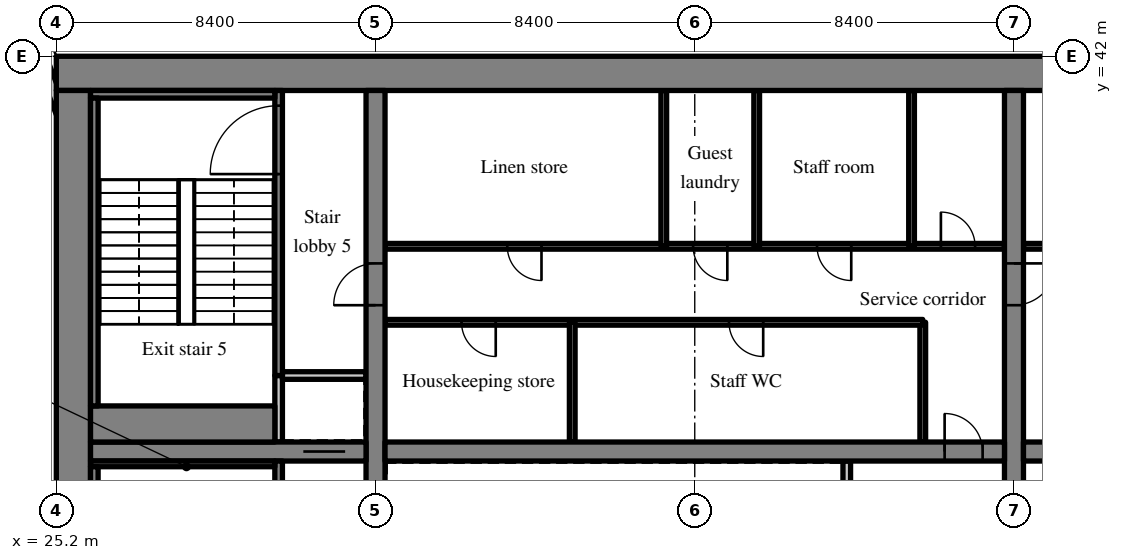
"""IFC4 building model, lengths in metres.
Left out: names, types, materials, properties, quantities, classifications, styles, units other than length and angle.
Written with IfcOpenShell. Run it as: python <this file> out.ifc"""

import sys

from ifc_helpers import new_model, si_unit, direction, frame, frame_2d, origin, place, context, subcontext, project, spatial, rectangle, extrude, source, transform, mapped, element, fill, save


model = new_model("IFC4")
c1 = context("Model", 3, precision=1e-05, world=origin(), true_north=direction((0.0, 1.0)))
c2 = subcontext(c1, "Body", "Model", "MODEL_VIEW")
j1 = project(units=[si_unit("LENGTHUNIT", "METRE"), si_unit("PLANEANGLEUNIT", "RADIAN")], contexts=[c1])
p1 = place(None, origin())
s1 = spatial("IfcSite", under=j1, at=p1, CompositionType="ELEMENT")
p2 = place(p1, origin())
s2 = spatial("IfcBuilding", under=s1, at=p2, CompositionType="ELEMENT")
p3 = place(p2, frame((0.0, 0.0, 95.2)))
s3 = spatial("IfcBuildingStorey", under=s2, at=p3, CompositionType="ELEMENT", Elevation=95.2)
m1 = source(origin(), c2, "Body", "SweptSolid", [
    extrude(rectangle(XDim=50.4, YDim=0.9, at=frame_2d((25.2, 0.0))), origin(), (0.0, 0.0, 1.0), 3.52),
])
p4 = place(p3, frame((25.2, 41.55, 0.0), z_axis=(0.0, 0.0, 1.0), x_axis=(1.0, 0.0, 0.0)))
e1 = element("IfcWall", 1, at=p4, inside=s3, PredefinedType="SHEAR", context=c2, shape_type="MappedRepresentation", body=[
    mapped(m1, transform((0.0, 0.0, 0.0), scale=1.0)),
])
m2 = source(origin(), c2, "Body", "SweptSolid", [
    extrude(rectangle(XDim=18.2, YDim=0.9, at=frame_2d((9.1, 0.0))), origin(), (0.0, 0.0, 1.0), 3.52),
])
p5 = place(p3, frame((25.65, 22.9, 0.0), z_axis=(0.0, 0.0, 1.0), x_axis=(0.0, 1.0, 0.0)))
e2 = element("IfcWall", 2, at=p5, inside=s3, PredefinedType="SHEAR", context=c2, shape_type="MappedRepresentation", body=[
    mapped(m2, transform((0.0, 0.0, 0.0), scale=1.0)),
])
m3 = source(origin(), c2, "Body", "SweptSolid", [
    extrude(rectangle(XDim=18.2, YDim=0.5, at=frame_2d((9.1, 0.0))), origin(), (0.0, 0.0, 1.0), 3.52),
])
p6 = place(p3, frame((33.6, 22.9, 0.0), z_axis=(0.0, 0.0, 1.0), x_axis=(0.0, 1.0, 0.0)))
e3 = element("IfcWall", 3, at=p6, inside=s3, PredefinedType="SHEAR", context=c2, shape_type="MappedRepresentation", body=[
    mapped(m3, transform((0.0, 0.0, 0.0), scale=1.0)),
])
m4 = source(origin(), c2, "Body", "SweptSolid", [
    extrude(rectangle(XDim=1.1, YDim=2.1, at=frame_2d((0.55, 1.05))), frame((0.0, 0.26, 0.0), z_axis=(0.0, -1.0, 0.0), x_axis=(1.0, 0.0, 0.0)), (0.0, 0.0, 1.0), 0.52),
])
p7 = place(p6, frame((12.55, 0.0, 0.0)))
e4 = element("IfcOpeningElement", 4, at=p7, cuts=e3, PredefinedType="OPENING", context=c2, shape_type="MappedRepresentation", body=[
    mapped(m4, transform((0.0, 0.0, 0.0), scale=1.0)),
])
p8 = place(p3, frame((50.4, 22.9, 0.0), z_axis=(0.0, 0.0, 1.0), x_axis=(0.0, 1.0, 0.0)))
e5 = element("IfcWall", 5, at=p8, inside=s3, PredefinedType="SHEAR", context=c2, shape_type="MappedRepresentation", body=[
    mapped(m3, transform((0.0, 0.0, 0.0), scale=1.0)),
])
p9 = place(p8, frame((12.55, 0.0, 0.0)))
e6 = element("IfcOpeningElement", 6, at=p9, cuts=e5, PredefinedType="OPENING", context=c2, shape_type="MappedRepresentation", body=[
    mapped(m4, transform((0.0, 0.0, 0.0), scale=1.0)),
])
m5 = source(origin(), c2, "Body", "SweptSolid", [
    extrude(rectangle(XDim=7.25, YDim=0.5, at=frame_2d((3.625, 0.0))), origin(), (0.0, 0.0, 1.0), 3.52),
])
p10 = place(p3, frame((26.1, 31.6, 0.0), z_axis=(0.0, 0.0, 1.0), x_axis=(1.0, 0.0, 0.0)))
e7 = element("IfcWall", 7, at=p10, inside=s3, PredefinedType="SHEAR", context=c2, shape_type="MappedRepresentation", body=[
    mapped(m5, transform((0.0, 0.0, 0.0), scale=1.0)),
])
p11 = place(p10, frame((5.6, 0.0, 0.0)))
e8 = element("IfcOpeningElement", 8, at=p11, cuts=e7, PredefinedType="OPENING", context=c2, shape_type="MappedRepresentation", body=[
    mapped(m4, transform((0.0, 0.0, 0.0), scale=1.0)),
])
m6 = source(origin(), c2, "Body", "SweptSolid", [
    extrude(rectangle(XDim=16.3, YDim=0.5, at=frame_2d((8.15, 0.0))), origin(), (0.0, 0.0, 1.0), 3.52),
])
p12 = place(p3, frame((33.85, 31.6, 0.0), z_axis=(0.0, 0.0, 1.0), x_axis=(1.0, 0.0, 0.0)))
e9 = element("IfcWall", 9, at=p12, inside=s3, PredefinedType="SHEAR", context=c2, shape_type="MappedRepresentation", body=[
    mapped(m6, transform((0.0, 0.0, 0.0), scale=1.0)),
])
m7 = source(origin(), c2, "Body", "SweptSolid", [
    extrude(rectangle(XDim=1.0, YDim=2.1, at=frame_2d((0.5, 1.05))), frame((0.0, 0.26, 0.0), z_axis=(0.0, -1.0, 0.0), x_axis=(1.0, 0.0, 0.0)), (0.0, 0.0, 1.0), 0.52),
])
p13 = place(p12, frame((14.725, 0.0, 0.0)))
e10 = element("IfcOpeningElement", 10, at=p13, cuts=e9, PredefinedType="OPENING", context=c2, shape_type="MappedRepresentation", body=[
    mapped(m7, transform((0.0, 0.0, 0.0), scale=1.0)),
])
m8 = source(origin(), c2, "Body", "SweptSolid", [
    extrude(rectangle(XDim=16.3, YDim=0.5, at=frame_2d((8.15, 0.0))), origin(), (0.0, 0.0, 1.0), 3.52),
])
p14 = place(p3, frame((50.65, 31.6, 0.0), z_axis=(0.0, 0.0, 1.0), x_axis=(1.0, 0.0, 0.0)))
e11 = element("IfcWall", 11, at=p14, inside=s3, PredefinedType="SHEAR", context=c2, shape_type="MappedRepresentation", body=[
    mapped(m8, transform((0.0, 0.0, 0.0), scale=1.0)),
])
p15 = place(p14, frame((0.575, 0.0, 0.0)))
e12 = element("IfcOpeningElement", 12, at=p15, cuts=e11, PredefinedType="OPENING", context=c2, shape_type="MappedRepresentation", body=[
    mapped(m7, transform((0.0, 0.0, 0.0), scale=1.0)),
])
m9 = source(origin(), c2, "Body", "SweptSolid", [
    extrude(rectangle(XDim=3.559, YDim=0.3, at=frame_2d((1.78, 0.0))), origin(), (0.0, 0.0, 1.0), 3.52),
])
p16 = place(p3, frame((25.55, 39.969, 0.0), z_axis=(0.0, 0.0, 1.0), x_axis=(-0.35779745313, 0.933799219604, 0.0)))
e13 = element("IfcWall", 13, at=p16, inside=s3, PredefinedType="SOLIDWALL", context=c2, shape_type="MappedRepresentation", body=[
    mapped(m9, transform((0.0, 0.0, 0.0), scale=1.0)),
])
m10 = source(origin(), c2, "Body", "SweptSolid", [
    extrude(rectangle(XDim=1.5, YDim=2.0, at=frame_2d((0.75, 1.0))), frame((0.0, 0.16, 0.0), z_axis=(0.0, -1.0, 0.0), x_axis=(1.0, 0.0, 0.0)), (0.0, 0.0, 1.0), 0.32),
])
p17 = place(p16, frame((1.903, 0.0, 0.9)))
e14 = element("IfcOpeningElement", 14, at=p17, cuts=e13, PredefinedType="OPENING", context=c2, shape_type="MappedRepresentation", body=[
    mapped(m10, transform((0.0, 0.0, 0.0), scale=1.0)),
])
m11 = source(origin(), c2, "Body", "SweptSolid", [
    extrude(rectangle(XDim=2.55, YDim=0.2, at=frame_2d((1.275, 0.0))), origin(), (0.0, 0.0, 1.0), 3.52),
])
p18 = place(p3, frame((46.0, 28.8, 0.0), z_axis=(0.0, 0.0, 1.0), x_axis=(0.0, 1.0, 0.0)))
e15 = element("IfcWall", 15, at=p18, inside=s3, PredefinedType="SOLIDWALL", context=c2, shape_type="MappedRepresentation", body=[
    mapped(m11, transform((0.0, 0.0, 0.0), scale=1.0)),
])
m12 = source(origin(), c2, "Body", "SweptSolid", [
    extrude(rectangle(XDim=3.15, YDim=0.15, at=frame_2d((1.575, 0.0))), origin(), (0.0, 0.0, 1.0), 3.52),
])
p19 = place(p3, frame((48.0, 31.85, 0.0), z_axis=(0.0, 0.0, 1.0), x_axis=(0.0, 1.0, 0.0)))
e16 = element("IfcWall", 16, at=p19, inside=s3, PredefinedType="PARTITIONING", context=c2, shape_type="MappedRepresentation", body=[
    mapped(m12, transform((0.0, 0.0, 0.0), scale=1.0)),
])
m13 = source(origin(), c2, "Body", "SweptSolid", [
    extrude(rectangle(XDim=14.15, YDim=0.15, at=frame_2d((7.075, 0.0))), origin(), (0.0, 0.0, 1.0), 3.52),
])
p20 = place(p3, frame((33.85, 35.0, 0.0), z_axis=(0.0, 0.0, 1.0), x_axis=(1.0, 0.0, 0.0)))
e17 = element("IfcWall", 17, at=p20, inside=s3, PredefinedType="PARTITIONING", context=c2, shape_type="MappedRepresentation", body=[
    mapped(m13, transform((0.0, 0.0, 0.0), scale=1.0)),
])
m14 = source(origin(), c2, "Body", "SweptSolid", [
    extrude(rectangle(XDim=0.9, YDim=2.1, at=frame_2d((0.45, 1.05))), frame((0.0, 0.085, 0.0), z_axis=(0.0, -1.0, 0.0), x_axis=(1.0, 0.0, 0.0)), (0.0, 0.0, 1.0), 0.17),
])
p21 = place(p20, frame((2.013, 0.0, 0.0)))
e18 = element("IfcOpeningElement", 18, at=p21, cuts=e17, PredefinedType="OPENING", context=c2, shape_type="MappedRepresentation", body=[
    mapped(m14, transform((0.0, 0.0, 0.0), scale=1.0)),
])
p22 = place(p20, frame((9.051, 0.0, 0.0)))
e19 = element("IfcOpeningElement", 19, at=p22, cuts=e17, PredefinedType="OPENING", context=c2, shape_type="MappedRepresentation", body=[
    mapped(m14, transform((0.0, 0.0, 0.0), scale=1.0)),
])
m15 = source(origin(), c2, "Body", "SweptSolid", [
    extrude(rectangle(XDim=16.3, YDim=0.15, at=frame_2d((8.15, 0.0))), origin(), (0.0, 0.0, 1.0), 3.52),
])
p23 = place(p3, frame((33.85, 37.0, 0.0), z_axis=(0.0, 0.0, 1.0), x_axis=(1.0, 0.0, 0.0)))
e20 = element("IfcWall", 20, at=p23, inside=s3, PredefinedType="PARTITIONING", context=c2, shape_type="MappedRepresentation", body=[
    mapped(m15, transform((0.0, 0.0, 0.0), scale=1.0)),
])
p24 = place(p23, frame((3.217, 0.0, 0.0)))
e21 = element("IfcOpeningElement", 21, at=p24, cuts=e20, PredefinedType="OPENING", context=c2, shape_type="MappedRepresentation", body=[
    mapped(m14, transform((0.0, 0.0, 0.0), scale=1.0)),
])
p25 = place(p23, frame((8.107, 0.0, 0.0)))
e22 = element("IfcOpeningElement", 22, at=p25, cuts=e20, PredefinedType="OPENING", context=c2, shape_type="MappedRepresentation", body=[
    mapped(m14, transform((0.0, 0.0, 0.0), scale=1.0)),
])
p26 = place(p23, frame((11.368, 0.0, 0.0)))
e23 = element("IfcOpeningElement", 23, at=p26, cuts=e20, PredefinedType="OPENING", context=c2, shape_type="MappedRepresentation", body=[
    mapped(m14, transform((0.0, 0.0, 0.0), scale=1.0)),
])
p27 = place(p23, frame((14.627, 0.0, 0.0)))
e24 = element("IfcOpeningElement", 24, at=p27, cuts=e20, PredefinedType="OPENING", context=c2, shape_type="MappedRepresentation", body=[
    mapped(m14, transform((0.0, 0.0, 0.0), scale=1.0)),
])
p28 = place(p3, frame((38.776, 31.85, 0.0), z_axis=(0.0, 0.0, 1.0), x_axis=(0.0, 1.0, 0.0)))
e25 = element("IfcWall", 25, at=p28, inside=s3, PredefinedType="PARTITIONING", context=c2, shape_type="MappedRepresentation", body=[
    mapped(m12, transform((0.0, 0.0, 0.0), scale=1.0)),
])
m16 = source(origin(), c2, "Body", "SweptSolid", [
    extrude(rectangle(XDim=4.1, YDim=0.15, at=frame_2d((2.05, 0.0))), origin(), (0.0, 0.0, 1.0), 3.52),
])
for number, where, z_axis, x_axis in (
    (26, (41.185, 37.0, 0.0), (0.0, 0.0, 1.0), (0.0, 1.0, 0.0)),
    (27, (43.63, 37.0, 0.0), (0.0, 0.0, 1.0), (0.0, 1.0, 0.0)),
    (28, (47.705, 37.0, 0.0), (0.0, 0.0, 1.0), (0.0, 1.0, 0.0)),
):
    element("IfcWall", number, at=place(p3, frame(where, z_axis=z_axis, x_axis=x_axis)), inside=s3, PredefinedType="PARTITIONING", context=c2, shape_type="MappedRepresentation", body=[
        mapped(m16, transform((0.0, 0.0, 0.0), scale=1.0)),
    ])
m17 = source(origin(), c2, "Body", "SweptSolid", [
    extrude(rectangle(XDim=16.3, YDim=0.15, at=frame_2d((8.15, 0.0))), origin(), (0.0, 0.0, 1.0), 3.52),
])
p29 = place(p3, frame((66.95, 37.0, 0.0), z_axis=(0.0, 0.0, 1.0), x_axis=(-1.0, 0.0, 0.0)))
e29 = element("IfcWall", 29, at=p29, inside=s3, PredefinedType="PARTITIONING", context=c2, shape_type="MappedRepresentation", body=[
    mapped(m17, transform((0.0, 0.0, 0.0), scale=1.0)),
])
p30 = place(p29, frame((0.773, 0.0, 0.0)))
e30 = element("IfcOpeningElement", 30, at=p30, cuts=e29, PredefinedType="OPENING", context=c2, shape_type="MappedRepresentation", body=[
    mapped(m14, transform((0.0, 0.0, 0.0), scale=1.0)),
])
p31 = place(p29, frame((3.625, 0.0, 0.0)))
e31 = element("IfcOpeningElement", 31, at=p31, cuts=e29, PredefinedType="OPENING", context=c2, shape_type="MappedRepresentation", body=[
    mapped(m14, transform((0.0, 0.0, 0.0), scale=1.0)),
])
p32 = place(p29, frame((9.33, 0.0, 0.0)))
e32 = element("IfcOpeningElement", 32, at=p32, cuts=e29, PredefinedType="OPENING", context=c2, shape_type="MappedRepresentation", body=[
    mapped(m14, transform((0.0, 0.0, 0.0), scale=1.0)),
])
p33 = place(p29, frame((14.627, 0.0, 0.0)))
e33 = element("IfcOpeningElement", 33, at=p33, cuts=e29, PredefinedType="OPENING", context=c2, shape_type="MappedRepresentation", body=[
    mapped(m14, transform((0.0, 0.0, 0.0), scale=1.0)),
])
m18 = source(origin(), c2, "Body", "SweptSolid", [
    extrude(rectangle(XDim=8.45, YDim=0.2, at=frame_2d((4.225, 0.0))), origin(), (0.0, 0.0, 1.0), 3.52),
])
p34 = place(p3, frame((31.05, 22.9, 0.0), z_axis=(0.0, 0.0, 1.0), x_axis=(0.0, 1.0, 0.0)))
e34 = element("IfcWall", 34, at=p34, inside=s3, PredefinedType="SOLIDWALL", context=c2, shape_type="MappedRepresentation", body=[
    mapped(m18, transform((0.0, 0.0, 0.0), scale=1.0)),
])
m19 = source(origin(), c2, "Body", "SweptSolid", [
    extrude(rectangle(XDim=1.2, YDim=2.1, at=frame_2d((0.6, 1.05))), frame((0.0, 0.11, 0.0), z_axis=(0.0, -1.0, 0.0), x_axis=(1.0, 0.0, 0.0)), (0.0, 0.0, 1.0), 0.22),
])
p35 = place(p34, frame((6.6, 0.0, 0.0)))
e35 = element("IfcOpeningElement", 35, at=p35, cuts=e34, PredefinedType="OPENING", context=c2, shape_type="MappedRepresentation", body=[
    mapped(m19, transform((0.0, 0.0, 0.0), scale=1.0)),
])
m20 = source(origin(), c2, "Body", "SweptSolid", [
    extrude(rectangle(XDim=1.75, YDim=0.2, at=frame_2d((0.875, 0.0))), origin(), (0.0, 0.0, 1.0), 3.52),
])
p36 = place(p3, frame((31.05, 31.85, 0.0), z_axis=(0.0, 0.0, 1.0), x_axis=(0.0, 1.0, 0.0)))
e36 = element("IfcWall", 36, at=p36, inside=s3, PredefinedType="SOLIDWALL", context=c2, shape_type="MappedRepresentation", body=[
    mapped(m20, transform((0.0, 0.0, 0.0), scale=1.0)),
])
m21 = source(origin(), c2, "Body", "SweptSolid", [
    extrude(rectangle(XDim=2.2, YDim=0.2, at=frame_2d((1.1, 0.0))), origin(), (0.0, 0.0, 1.0), 3.52),
])
p37 = place(p3, frame((31.15, 33.6, 0.0), z_axis=(0.0, 0.0, 1.0), x_axis=(1.0, 0.0, 0.0)))
e37 = element("IfcWall", 37, at=p37, inside=s3, PredefinedType="SOLIDWALL", context=c2, shape_type="MappedRepresentation", body=[
    mapped(m21, transform((0.0, 0.0, 0.0), scale=1.0)),
])
m22 = source(origin(), c2, "Body", "SweptSolid", [
    extrude(rectangle(XDim=7.5, YDim=0.2, at=frame_2d((3.75, 0.0))), origin(), (0.0, 0.0, 1.0), 3.52),
])
p38 = place(p3, frame((31.05, 33.6, 0.0), z_axis=(0.0, 0.0, 1.0), x_axis=(0.0, 1.0, 0.0)))
e38 = element("IfcWall", 38, at=p38, inside=s3, PredefinedType="SOLIDWALL", context=c2, shape_type="MappedRepresentation", body=[
    mapped(m22, transform((0.0, 0.0, 0.0), scale=1.0)),
])
m23 = source(origin(), c2, "Body", "SweptSolid", [
    extrude(rectangle(XDim=1.8, YDim=2.1, at=frame_2d((0.9, 1.05))), frame((0.0, 0.11, 0.0), z_axis=(0.0, -1.0, 0.0), x_axis=(1.0, 0.0, 0.0)), (0.0, 0.0, 1.0), 0.22),
])
p39 = place(p38, frame((5.3, 0.0, 0.0)))
e39 = element("IfcOpeningElement", 39, at=p39, cuts=e38, PredefinedType="OPENING", context=c2, shape_type="MappedRepresentation", body=[
    mapped(m23, transform((0.0, 0.0, 0.0), scale=1.0)),
])
m24 = source(origin(), c2, "Body", "SweptSolid", [
    extrude(rectangle(XDim=4.85, YDim=0.15, at=frame_2d((2.425, 0.0))), origin(), (0.0, 0.0, 1.0), 3.52),
])
p40 = place(p3, frame((26.1, 31.275, 0.0), z_axis=(0.0, 0.0, 1.0), x_axis=(1.0, 0.0, 0.0)))
e40 = element("IfcWall", 40, at=p40, inside=s3, PredefinedType="SOLIDWALL", context=c2, shape_type="MappedRepresentation", body=[
    mapped(m24, transform((0.0, 0.0, 0.0), scale=1.0)),
])
m25 = source(origin(), c2, "Body", "SweptSolid", [
    extrude(rectangle(XDim=8.1, YDim=0.2, at=frame_2d((4.05, 0.0))), origin(), (0.0, 0.0, 1.0), 3.52),
])
p41 = place(p3, frame((26.2, 23.1, 0.0), z_axis=(0.0, 0.0, 1.0), x_axis=(0.0, 1.0, 0.0)))
e41 = element("IfcWall", 41, at=p41, inside=s3, PredefinedType="SOLIDWALL", context=c2, shape_type="MappedRepresentation", body=[
    mapped(m25, transform((0.0, 0.0, 0.0), scale=1.0)),
])
m26 = source(origin(), c2, "Body", "SweptSolid", [
    extrude(rectangle(XDim=4.85, YDim=0.2, at=frame_2d((2.425, 0.0))), origin(), (0.0, 0.0, 1.0), 3.52),
])
p42 = place(p3, frame((26.1, 41.0, 0.0), z_axis=(0.0, 0.0, 1.0), x_axis=(1.0, 0.0, 0.0)))
e42 = element("IfcWall", 42, at=p42, inside=s3, PredefinedType="SOLIDWALL", context=c2, shape_type="MappedRepresentation", body=[
    mapped(m26, transform((0.0, 0.0, 0.0), scale=1.0)),
])
m27 = source(origin(), c2, "Body", "SweptSolid", [
    extrude(rectangle(XDim=4.85, YDim=0.95, at=frame_2d((2.425, 0.0))), origin(), (0.0, 0.0, 1.0), 3.52),
])
p43 = place(p3, frame((26.1, 32.325, 0.0), z_axis=(0.0, 0.0, 1.0), x_axis=(1.0, 0.0, 0.0)))
e43 = element("IfcWall", 43, at=p43, inside=s3, PredefinedType="SOLIDWALL", context=c2, shape_type="MappedRepresentation", body=[
    mapped(m27, transform((0.0, 0.0, 0.0), scale=1.0)),
])
p44 = place(p3, frame((26.2, 32.8, 0.0), z_axis=(0.0, 0.0, 1.0), x_axis=(0.0, 1.0, 0.0)))
e44 = element("IfcWall", 44, at=p44, inside=s3, PredefinedType="SOLIDWALL", context=c2, shape_type="MappedRepresentation", body=[
    mapped(m25, transform((0.0, 0.0, 0.0), scale=1.0)),
])
m28 = source(origin(), c2, "Body", "SweptSolid", [
    extrude(rectangle(XDim=1.0, YDim=2.1, at=frame_2d((0.5, 1.05))), frame((0.0, 0.025, 0.0), z_axis=(0.0, -1.0, 0.0), x_axis=(1.0, 0.0, 0.0)), (0.0, 0.0, 1.0), 0.05),
])
p45 = place(p13, origin())
e45 = element("IfcDoor", 45, at=p45, inside=s3, OperationType="SINGLE_SWING_LEFT", PredefinedType="DOOR", context=c2, shape_type="MappedRepresentation", body=[
    mapped(m28, transform((0.0, 0.0, 0.0), scale=1.0)),
])
fill(e10, e45)
m29 = source(origin(), c2, "Body", "SweptSolid", [
    extrude(rectangle(XDim=0.9, YDim=2.1, at=frame_2d((0.45, 1.05))), frame((0.0, 0.025, 0.0), z_axis=(0.0, -1.0, 0.0), x_axis=(1.0, 0.0, 0.0)), (0.0, 0.0, 1.0), 0.05),
])
p46 = place(p21, origin())
e46 = element("IfcDoor", 46, at=p46, inside=s3, OperationType="SINGLE_SWING_RIGHT", PredefinedType="DOOR", context=c2, shape_type="MappedRepresentation", body=[
    mapped(m29, transform((0.0, 0.0, 0.0), scale=1.0)),
])
fill(e18, e46)
p47 = place(p22, origin())
e47 = element("IfcDoor", 47, at=p47, inside=s3, OperationType="SINGLE_SWING_RIGHT", PredefinedType="DOOR", context=c2, shape_type="MappedRepresentation", body=[
    mapped(m29, transform((0.0, 0.0, 0.0), scale=1.0)),
])
fill(e19, e47)
p48 = place(p24, origin())
e48 = element("IfcDoor", 48, at=p48, inside=s3, OperationType="SINGLE_SWING_RIGHT", PredefinedType="DOOR", context=c2, shape_type="MappedRepresentation", body=[
    mapped(m29, transform((0.0, 0.0, 0.0), scale=1.0)),
])
fill(e21, e48)
p49 = place(p25, origin())
e49 = element("IfcDoor", 49, at=p49, inside=s3, OperationType="SINGLE_SWING_RIGHT", PredefinedType="DOOR", context=c2, shape_type="MappedRepresentation", body=[
    mapped(m29, transform((0.0, 0.0, 0.0), scale=1.0)),
])
fill(e22, e49)
p50 = place(p26, origin())
e50 = element("IfcDoor", 50, at=p50, inside=s3, OperationType="SINGLE_SWING_RIGHT", PredefinedType="DOOR", context=c2, shape_type="MappedRepresentation", body=[
    mapped(m29, transform((0.0, 0.0, 0.0), scale=1.0)),
])
fill(e23, e50)
p51 = place(p27, origin())
e51 = element("IfcDoor", 51, at=p51, inside=s3, OperationType="SINGLE_SWING_LEFT", PredefinedType="DOOR", context=c2, shape_type="MappedRepresentation", body=[
    mapped(m29, transform((0.0, 0.0, 0.0), scale=1.0)),
])
fill(e24, e51)
m30 = source(origin(), c2, "Body", "SweptSolid", [
    extrude(rectangle(XDim=1.1, YDim=2.1, at=frame_2d((0.55, 1.05))), frame((0.0, 0.025, 0.0), z_axis=(0.0, -1.0, 0.0), x_axis=(1.0, 0.0, 0.0)), (0.0, 0.0, 1.0), 0.05),
])
p52 = place(p11, origin())
e52 = element("IfcDoor", 52, at=p52, inside=s3, OperationType="SLIDING_TO_RIGHT", PredefinedType="DOOR", context=c2, shape_type="MappedRepresentation", body=[
    mapped(m30, transform((0.0, 0.0, 0.0), scale=1.0)),
])
fill(e8, e52)
m31 = source(origin(), c2, "Body", "SweptSolid", [
    extrude(rectangle(XDim=1.8, YDim=2.1, at=frame_2d((0.9, 1.05))), frame((0.0, 0.025, 0.0), z_axis=(0.0, -1.0, 0.0), x_axis=(1.0, 0.0, 0.0)), (0.0, 0.0, 1.0), 0.05),
])
p53 = place(p39, origin())
e53 = element("IfcDoor", 53, at=p53, inside=s3, OperationType="SINGLE_SWING_LEFT", PredefinedType="DOOR", context=c2, shape_type="MappedRepresentation", body=[
    mapped(m31, transform((0.0, 0.0, 0.0), scale=1.0)),
])
fill(e39, e53)
p54 = place(p7, origin())
e54 = element("IfcDoor", 54, at=p54, inside=s3, OperationType="SINGLE_SWING_LEFT", PredefinedType="DOOR", context=c2, shape_type="MappedRepresentation", body=[
    mapped(m30, transform((0.0, 0.0, 0.0), scale=1.0)),
])
fill(e4, e54)
p55 = place(p9, origin())
e55 = element("IfcDoor", 55, at=p55, inside=s3, OperationType="SINGLE_SWING_RIGHT", PredefinedType="DOOR", context=c2, shape_type="MappedRepresentation", body=[
    mapped(m30, transform((0.0, 0.0, 0.0), scale=1.0)),
])
fill(e6, e55)
save(model, sys.argv[1])
